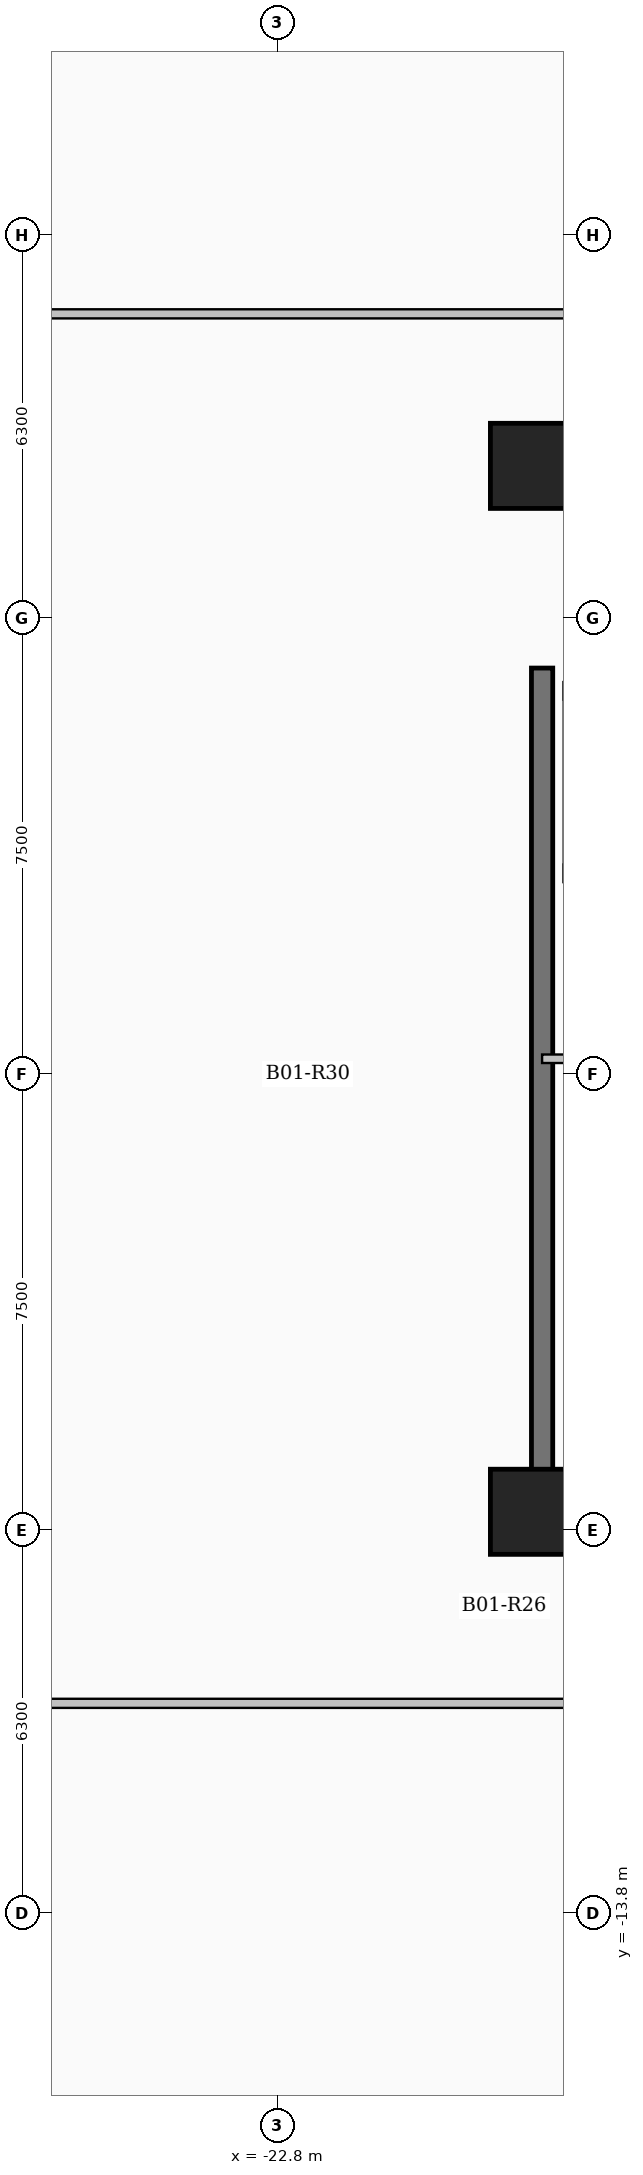
"""IFC4 building model, lengths in metres.
Left out: names, types, materials, properties, quantities, classifications, styles, units other than length and angle.
Written with IfcOpenShell. Run it as: python <this file> out.ifc"""

import sys

from ifc_helpers import new_model, si_unit, direction, frame, frame_2d, origin, origin_2d, place, context, subcontext, project, spatial, rectangle, extrude, element, save


model = new_model("IFC4")
c1 = context("Model", 3, precision=1e-05, world=origin(), true_north=direction((0.0, 1.0)))
c2 = subcontext(c1, "Body", "Model", "MODEL_VIEW")
j1 = project(units=[si_unit("LENGTHUNIT", "METRE"), si_unit("PLANEANGLEUNIT", "RADIAN")], contexts=[c1])
p1 = place(None, origin())
s1 = spatial("IfcSite", under=j1, at=p1, CompositionType="ELEMENT")
p2 = place(p1, origin())
s2 = spatial("IfcBuilding", under=s1, at=p2, CompositionType="ELEMENT")
p3 = place(p2, frame((0.0, 0.0, -4.6)))
s3 = spatial("IfcBuildingStorey", under=s2, at=p3, CompositionType="ELEMENT", Elevation=-4.6)
for number, where, z_axis, x_axis in (
    (1, (-18.6, -7.2, 0.0), (0.0, 0.0, 1.0), (1.0, 0.0, 0.0)),
    (2, (-18.6, 10.0, 0.0), (0.0, 0.0, 1.0), (1.0, 0.0, 0.0)),
):
    element("IfcColumn", number, at=place(p3, frame(where, z_axis=z_axis, x_axis=x_axis)), inside=s3, PredefinedType="COLUMN", context=c2, shape_type="SweptSolid", body=[
        extrude(rectangle(XDim=1.4, YDim=1.4, at=origin_2d()), origin(), (0.0, 0.0, 1.0), 4.6),
    ])
p4 = place(p3, frame((-18.45, -7.375, 0.0), z_axis=(0.0, 0.0, 1.0), x_axis=(0.0, 1.0, 0.0)))
e3 = element("IfcWall", 3, at=p4, inside=s3, PredefinedType="SHEAR", context=c2, shape_type="SweptSolid", body=[
    extrude(rectangle(XDim=14.05, YDim=0.35, at=frame_2d((7.025, 0.0))), origin(), (0.0, 0.0, 1.0), 4.6),
])
p5 = place(p3, frame((-18.625, -7.2, 0.0), z_axis=(0.0, 0.0, 1.0), x_axis=(1.0, 0.0, 0.0)))
e4 = element("IfcWall", 4, at=p5, inside=s3, PredefinedType="SHEAR", context=c2, shape_type="SweptSolid", body=[
    extrude(rectangle(XDim=8.55, YDim=0.35, at=frame_2d((4.275, 0.0))), origin(), (0.0, 0.0, 1.0), 4.6),
])
p6 = place(p3, frame((-18.45, 0.25, 0.0), z_axis=(0.0, 0.0, 1.0), x_axis=(1.0, 0.0, 0.0)))
e5 = element("IfcWall", 5, at=p6, inside=s3, PredefinedType="PARTITIONING", context=c2, shape_type="SweptSolid", body=[
    extrude(rectangle(XDim=3.05, YDim=0.14, at=frame_2d((1.525, 0.0))), origin(), (0.0, 0.0, 1.0), 4.3),
])
p7 = place(p6, frame((1.05, 0.0, 0.0)))
e6 = element("IfcOpeningElement", 6, at=p7, cuts=e5, PredefinedType="OPENING", context=c2, shape_type="SweptSolid", body=[
    extrude(rectangle(XDim=0.9, YDim=2.08, at=frame_2d((0.45, 1.04))), frame((0.0, 0.08, 0.0), z_axis=(0.0, -1.0, 0.0), x_axis=(1.0, 0.0, 0.0)), (0.0, 0.0, 1.0), 0.16),
])
p8 = place(p3, frame((-28.0, 12.5, 0.0), z_axis=(0.0, 0.0, 1.0), x_axis=(1.0, 0.0, 0.0)))
e7 = element("IfcWall", 7, at=p8, inside=s3, PredefinedType="PARTITIONING", context=c2, shape_type="SweptSolid", body=[
    extrude(rectangle(XDim=24.15, YDim=0.15, at=frame_2d((12.075, 0.0))), origin(), (0.0, 0.0, 1.0), 4.3),
])
p9 = place(p3, frame((-28.0, -10.35, 0.0), z_axis=(0.0, 0.0, 1.0), x_axis=(1.0, 0.0, 0.0)))
e8 = element("IfcWall", 8, at=p9, inside=s3, PredefinedType="PARTITIONING", context=c2, shape_type="SweptSolid", body=[
    extrude(rectangle(XDim=19.45, YDim=0.15, at=frame_2d((9.725, 0.0))), origin(), (0.0, 0.0, 1.0), 4.3),
])
save(model, sys.argv[1])
